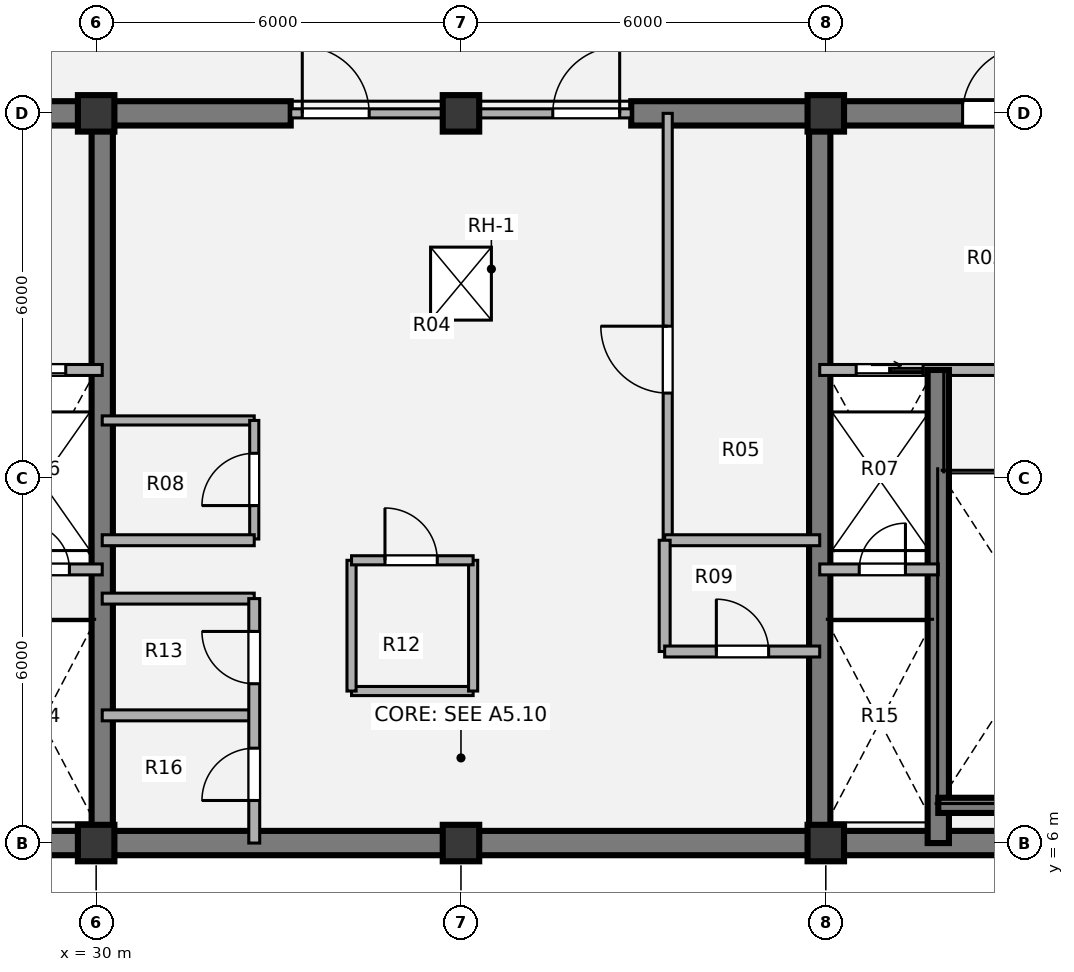
"""IFC4 building model, lengths in metres.
Left out: names, types, materials, properties, quantities, classifications, styles, units other than length and angle.
Written with IfcOpenShell. Run it as: python <this file> out.ifc"""

import sys

from ifc_helpers import new_model, si_unit, direction, frame, frame_2d, origin, origin_2d, place, context, subcontext, project, spatial, rectangle, extrude, source, transform, mapped, element, fill, save


model = new_model("IFC4")
c1 = context("Model", 3, precision=1e-05, world=origin(), true_north=direction((0.0, 1.0)))
c2 = subcontext(c1, "Body", "Model", "MODEL_VIEW")
j1 = project(units=[si_unit("LENGTHUNIT", "METRE"), si_unit("PLANEANGLEUNIT", "RADIAN")], contexts=[c1])
p1 = place(None, origin())
s1 = spatial("IfcSite", under=j1, at=p1, CompositionType="ELEMENT")
p2 = place(p1, origin())
s2 = spatial("IfcBuilding", under=s1, at=p2, CompositionType="ELEMENT")
p3 = place(p2, frame((0.0, 0.0, 315.72)))
s3 = spatial("IfcBuildingStorey", under=s2, at=p3, CompositionType="ELEMENT", Elevation=315.72)
m1 = source(origin(), c2, "Body", "SweptSolid", [
    extrude(rectangle(XDim=0.6, YDim=0.6, at=origin_2d()), origin(), (0.0, 0.0, 1.0), 3.96),
])
for number, where, z_axis, x_axis in (
    (1, (30.0, 6.0, 0.0), (0.0, 0.0, 1.0), (1.0, 0.0, 0.0)),
    (2, (36.0, 6.0, 0.0), (0.0, 0.0, 1.0), (1.0, 0.0, 0.0)),
    (3, (42.0, 6.0, 0.0), (0.0, 0.0, 1.0), (1.0, 0.0, 0.0)),
    (4, (30.0, 18.0, 0.0), (0.0, 0.0, 1.0), (1.0, 0.0, 0.0)),
    (5, (36.0, 18.0, 0.0), (0.0, 0.0, 1.0), (1.0, 0.0, 0.0)),
    (6, (42.0, 18.0, 0.0), (0.0, 0.0, 1.0), (1.0, 0.0, 0.0)),
):
    element("IfcColumn", number, at=place(p3, frame(where, z_axis=z_axis, x_axis=x_axis)), inside=s3, PredefinedType="COLUMN", context=c2, shape_type="MappedRepresentation", body=[
        mapped(m1, transform((0.0, 0.0, 0.0), x_axis=(1.0, 0.0, 0.0), y_axis=(0.0, 1.0, 0.0), z_axis=(0.0, 0.0, 1.0), scale=1.0)),
    ])
p4 = place(p3, frame((48.2, 6.0, 0.0), z_axis=(0.0, 0.0, 1.0), x_axis=(-1.0, 0.0, 0.0)))
e7 = element("IfcWall", 7, at=p4, inside=s3, PredefinedType="SHEAR", context=c2, shape_type="SweptSolid", body=[
    extrude(rectangle(XDim=24.4, YDim=0.4, at=frame_2d((12.2, 0.0))), origin(), (0.0, 0.0, 1.0), 3.96),
])
p5 = place(p3, frame((23.8, 18.0, 0.0), z_axis=(0.0, 0.0, 1.0), x_axis=(1.0, 0.0, 0.0)))
e8 = element("IfcWall", 8, at=p5, inside=s3, PredefinedType="SHEAR", context=c2, shape_type="SweptSolid", body=[
    extrude(rectangle(XDim=9.4, YDim=0.4, at=frame_2d((4.7, 0.0))), origin(), (0.0, 0.0, 1.0), 3.96),
])
p6 = place(p5, frame((2.95, 0.0, 0.0)))
e9 = element("IfcOpeningElement", 9, at=p6, cuts=e8, PredefinedType="OPENING", context=c2, shape_type="SweptSolid", body=[
    extrude(rectangle(XDim=1.1, YDim=2.1, at=origin_2d()), frame((0.55, 0.21, 1.05), z_axis=(0.0, -1.0, 0.0), x_axis=(1.0, 0.0, 0.0)), (0.0, 0.0, 1.0), 0.42),
])
p7 = place(p3, frame((38.8, 18.0, 0.0), z_axis=(0.0, 0.0, 1.0), x_axis=(1.0, 0.0, 0.0)))
e10 = element("IfcWall", 10, at=p7, inside=s3, PredefinedType="SHEAR", context=c2, shape_type="SweptSolid", body=[
    extrude(rectangle(XDim=9.4, YDim=0.4, at=frame_2d((4.7, 0.0))), origin(), (0.0, 0.0, 1.0), 3.96),
])
p8 = place(p7, frame((5.45, 0.0, 0.0)))
e11 = element("IfcOpeningElement", 11, at=p8, cuts=e10, PredefinedType="OPENING", context=c2, shape_type="SweptSolid", body=[
    extrude(rectangle(XDim=1.1, YDim=2.1, at=origin_2d()), frame((0.55, 0.21, 1.05), z_axis=(0.0, -1.0, 0.0), x_axis=(1.0, 0.0, 0.0)), (0.0, 0.0, 1.0), 0.42),
])
for number, where, z_axis, x_axis in (
    (12, (30.1, 6.0, 0.0), (0.0, 0.0, 1.0), (0.0, 1.0, 0.0)),
    (13, (41.9, 18.0, 0.0), (0.0, 0.0, 1.0), (0.0, -1.0, 0.0)),
):
    element("IfcWall", number, at=place(p3, frame(where, z_axis=z_axis, x_axis=x_axis)), inside=s3, PredefinedType="SHEAR", context=c2, shape_type="SweptSolid", body=[
        extrude(rectangle(XDim=12.0, YDim=0.35, at=frame_2d((6.0, 0.0))), origin(), (0.0, 0.0, 1.0), 3.96),
    ])
p9 = place(p3, frame((30.1, 12.95, 0.0), z_axis=(0.0, 0.0, 1.0), x_axis=(1.0, 0.0, 0.0)))
e14 = element("IfcWall", 14, at=p9, inside=s3, PredefinedType="PARTITIONING", context=c2, shape_type="SweptSolid", body=[
    extrude(rectangle(XDim=2.5, YDim=0.15, at=frame_2d((1.25, 0.0))), origin(), (0.0, 0.0, 1.0), 3.61),
])
p10 = place(p3, frame((32.6, 11.0, 0.0), z_axis=(0.0, 0.0, 1.0), x_axis=(0.0, 1.0, 0.0)))
e15 = element("IfcWall", 15, at=p10, inside=s3, PredefinedType="PARTITIONING", context=c2, shape_type="SweptSolid", body=[
    extrude(rectangle(XDim=1.95, YDim=0.15, at=frame_2d((0.975, 0.0))), origin(), (0.0, 0.0, 1.0), 3.61),
])
p11 = place(p10, frame((0.55, 0.0, 0.0)))
e16 = element("IfcOpeningElement", 16, at=p11, cuts=e15, PredefinedType="OPENING", context=c2, shape_type="SweptSolid", body=[
    extrude(rectangle(XDim=0.86, YDim=2.1, at=origin_2d()), frame((0.43, 0.085, 1.05), z_axis=(0.0, -1.0, 0.0), x_axis=(1.0, 0.0, 0.0)), (0.0, 0.0, 1.0), 0.17),
])
p12 = place(p3, frame((34.2, 8.5, 0.0), z_axis=(0.0, 0.0, 1.0), x_axis=(1.0, 0.0, 0.0)))
e17 = element("IfcWall", 17, at=p12, inside=s3, PredefinedType="PARTITIONING", context=c2, shape_type="SweptSolid", body=[
    extrude(rectangle(XDim=2.0, YDim=0.15, at=frame_2d((1.0, 0.0))), origin(), (0.0, 0.0, 1.0), 3.61),
])
p13 = place(p3, frame((34.2, 8.5, 0.0), z_axis=(0.0, 0.0, 1.0), x_axis=(0.0, 1.0, 0.0)))
e18 = element("IfcWall", 18, at=p13, inside=s3, PredefinedType="PARTITIONING", context=c2, shape_type="SweptSolid", body=[
    extrude(rectangle(XDim=2.15, YDim=0.15, at=frame_2d((1.075, 0.0))), origin(), (0.0, 0.0, 1.0), 3.61),
])
p14 = place(p3, frame((36.2, 8.5, 0.0), z_axis=(0.0, 0.0, 1.0), x_axis=(0.0, 1.0, 0.0)))
e19 = element("IfcWall", 19, at=p14, inside=s3, PredefinedType="PARTITIONING", context=c2, shape_type="SweptSolid", body=[
    extrude(rectangle(XDim=2.15, YDim=0.15, at=frame_2d((1.075, 0.0))), origin(), (0.0, 0.0, 1.0), 2.825),
])
p15 = place(p3, frame((34.2, 10.65, 0.0), z_axis=(0.0, 0.0, 1.0), x_axis=(1.0, 0.0, 0.0)))
e20 = element("IfcWall", 20, at=p15, inside=s3, PredefinedType="PARTITIONING", context=c2, shape_type="SweptSolid", body=[
    extrude(rectangle(XDim=2.0, YDim=0.15, at=frame_2d((1.0, 0.0))), origin(), (0.0, 0.0, 1.0), 3.61),
])
p16 = place(p15, frame((0.55, 0.0, 0.0)))
e21 = element("IfcOpeningElement", 21, at=p16, cuts=e20, PredefinedType="OPENING", context=c2, shape_type="SweptSolid", body=[
    extrude(rectangle(XDim=0.86, YDim=2.1, at=origin_2d()), frame((0.43, 0.085, 1.05), z_axis=(0.0, -1.0, 0.0), x_axis=(1.0, 0.0, 0.0)), (0.0, 0.0, 1.0), 0.17),
])
p17 = place(p3, frame((39.4, 11.0, 0.0), z_axis=(0.0, 0.0, 1.0), x_axis=(0.0, 1.0, 0.0)))
e22 = element("IfcWall", 22, at=p17, inside=s3, PredefinedType="PARTITIONING", context=c2, shape_type="SweptSolid", body=[
    extrude(rectangle(XDim=7.0, YDim=0.15, at=frame_2d((3.5, 0.0))), origin(), (0.0, 0.0, 1.0), 3.61),
])
p18 = place(p17, frame((2.4, 0.0, 0.0)))
e23 = element("IfcOpeningElement", 23, at=p18, cuts=e22, PredefinedType="OPENING", context=c2, shape_type="SweptSolid", body=[
    extrude(rectangle(XDim=1.1, YDim=2.1, at=origin_2d()), frame((0.55, 0.085, 1.05), z_axis=(0.0, -1.0, 0.0), x_axis=(1.0, 0.0, 0.0)), (0.0, 0.0, 1.0), 0.17),
])
p19 = place(p3, frame((30.1, 10.98, 0.0), z_axis=(0.0, 0.0, 1.0), x_axis=(1.0, 0.0, 0.0)))
e24 = element("IfcWall", 24, at=p19, inside=s3, PredefinedType="PARTITIONING", context=c2, shape_type="SweptSolid", body=[
    extrude(rectangle(XDim=2.5, YDim=0.18, at=frame_2d((1.25, 0.0))), origin(), (0.0, 0.0, 1.0), 3.61),
])
p20 = place(p3, frame((39.35, 10.98, 0.0), z_axis=(0.0, 0.0, 1.0), x_axis=(1.0, 0.0, 0.0)))
e25 = element("IfcWall", 25, at=p20, inside=s3, PredefinedType="PARTITIONING", context=c2, shape_type="SweptSolid", body=[
    extrude(rectangle(XDim=2.55, YDim=0.18, at=frame_2d((1.275, 0.0))), origin(), (0.0, 0.0, 1.0), 3.61),
])
for number, where, z_axis, x_axis in (
    (26, (30.1, 8.1, 0.0), (0.0, 0.0, 1.0), (1.0, 0.0, 0.0)),
    (27, (30.1, 10.02, 0.0), (0.0, 0.0, 1.0), (1.0, 0.0, 0.0)),
):
    element("IfcWall", number, at=place(p3, frame(where, z_axis=z_axis, x_axis=x_axis)), inside=s3, PredefinedType="PARTITIONING", context=c2, shape_type="SweptSolid", body=[
        extrude(rectangle(XDim=2.5, YDim=0.18, at=frame_2d((1.25, 0.0))), origin(), (0.0, 0.0, 1.0), 3.61),
    ])
p21 = place(p3, frame((32.6, 6.0, 0.0), z_axis=(0.0, 0.0, 1.0), x_axis=(0.0, 1.0, 0.0)))
e28 = element("IfcWall", 28, at=p21, inside=s3, PredefinedType="PARTITIONING", context=c2, shape_type="SweptSolid", body=[
    extrude(rectangle(XDim=4.02, YDim=0.18, at=frame_2d((2.01, 0.0))), origin(), (0.0, 0.0, 1.0), 3.61),
])
p22 = place(p21, frame((0.7, 0.0, 0.0)))
e29 = element("IfcOpeningElement", 29, at=p22, cuts=e28, PredefinedType="OPENING", context=c2, shape_type="SweptSolid", body=[
    extrude(rectangle(XDim=0.86, YDim=2.1, at=origin_2d()), frame((0.43, 0.1, 1.05), z_axis=(0.0, -1.0, 0.0), x_axis=(1.0, 0.0, 0.0)), (0.0, 0.0, 1.0), 0.2),
])
p23 = place(p21, frame((2.62, 0.0, 0.0)))
e30 = element("IfcOpeningElement", 30, at=p23, cuts=e28, PredefinedType="OPENING", context=c2, shape_type="SweptSolid", body=[
    extrude(rectangle(XDim=0.86, YDim=2.1, at=origin_2d()), frame((0.43, 0.1, 1.05), z_axis=(0.0, -1.0, 0.0), x_axis=(1.0, 0.0, 0.0)), (0.0, 0.0, 1.0), 0.2),
])
p24 = place(p3, frame((39.35, 9.15, 0.0), z_axis=(0.0, 0.0, 1.0), x_axis=(0.0, 1.0, 0.0)))
e31 = element("IfcWall", 31, at=p24, inside=s3, PredefinedType="PARTITIONING", context=c2, shape_type="SweptSolid", body=[
    extrude(rectangle(XDim=1.83, YDim=0.18, at=frame_2d((0.915, 0.0))), origin(), (0.0, 0.0, 1.0), 3.61),
])
p25 = place(p3, frame((39.35, 9.15, 0.0), z_axis=(0.0, 0.0, 1.0), x_axis=(1.0, 0.0, 0.0)))
e32 = element("IfcWall", 32, at=p25, inside=s3, PredefinedType="PARTITIONING", context=c2, shape_type="SweptSolid", body=[
    extrude(rectangle(XDim=2.55, YDim=0.18, at=frame_2d((1.275, 0.0))), origin(), (0.0, 0.0, 1.0), 3.61),
])
p26 = place(p25, frame((0.85, 0.0, 0.0)))
e33 = element("IfcOpeningElement", 33, at=p26, cuts=e32, PredefinedType="OPENING", context=c2, shape_type="SweptSolid", body=[
    extrude(rectangle(XDim=0.86, YDim=2.1, at=origin_2d()), frame((0.43, 0.1, 1.05), z_axis=(0.0, -1.0, 0.0), x_axis=(1.0, 0.0, 0.0)), (0.0, 0.0, 1.0), 0.2),
])
p27 = place(p3, frame((33.2, 18.0, 0.0), z_axis=(0.0, 0.0, 1.0), x_axis=(1.0, 0.0, 0.0)))
e34 = element("IfcWall", 34, at=p27, inside=s3, PredefinedType="PARTITIONING", context=c2, shape_type="SweptSolid", body=[
    extrude(rectangle(XDim=5.6, YDim=0.15, at=frame_2d((2.8, 0.0))), origin(), (0.0, 0.0, 1.0), 2.625),
])
p28 = place(p27, frame((0.19, 0.0, 0.0)))
e35 = element("IfcOpeningElement", 35, at=p28, cuts=e34, PredefinedType="OPENING", context=c2, shape_type="SweptSolid", body=[
    extrude(rectangle(XDim=1.1, YDim=2.1, at=origin_2d()), frame((0.55, 0.085, 1.05), z_axis=(0.0, -1.0, 0.0), x_axis=(1.0, 0.0, 0.0)), (0.0, 0.0, 1.0), 0.17),
])
p29 = place(p27, frame((4.31, 0.0, 0.0)))
e36 = element("IfcOpeningElement", 36, at=p29, cuts=e34, PredefinedType="OPENING", context=c2, shape_type="SweptSolid", body=[
    extrude(rectangle(XDim=1.1, YDim=2.1, at=origin_2d()), frame((0.55, 0.085, 1.05), z_axis=(0.0, -1.0, 0.0), x_axis=(1.0, 0.0, 0.0)), (0.0, 0.0, 1.0), 0.17),
])
p30 = place(p3, frame((24.0, 13.78, 0.0), z_axis=(0.0, 0.0, 1.0), x_axis=(1.0, 0.0, 0.0)))
e37 = element("IfcWall", 37, at=p30, inside=s3, PredefinedType="PARTITIONING", context=c2, shape_type="SweptSolid", body=[
    extrude(rectangle(XDim=6.1, YDim=0.18, at=frame_2d((3.05, 0.0))), origin(), (0.0, 0.0, 1.0), 3.61),
])
p31 = place(p30, frame((1.15, 0.0, 0.0)))
e38 = element("IfcOpeningElement", 38, at=p31, cuts=e37, PredefinedType="OPENING", context=c2, shape_type="SweptSolid", body=[
    extrude(rectangle(XDim=1.1, YDim=2.1, at=origin_2d()), frame((0.55, 0.1, 1.05), z_axis=(0.0, -1.0, 0.0), x_axis=(1.0, 0.0, 0.0)), (0.0, 0.0, 1.0), 0.2),
])
p32 = place(p30, frame((4.4, 0.0, 0.0)))
e39 = element("IfcOpeningElement", 39, at=p32, cuts=e37, PredefinedType="OPENING", context=c2, shape_type="SweptSolid", body=[
    extrude(rectangle(XDim=1.1, YDim=2.1, at=origin_2d()), frame((0.55, 0.1, 1.05), z_axis=(0.0, -1.0, 0.0), x_axis=(1.0, 0.0, 0.0)), (0.0, 0.0, 1.0), 0.2),
])
p33 = place(p3, frame((28.15, 10.5, 0.0), z_axis=(0.0, 0.0, 1.0), x_axis=(1.0, 0.0, 0.0)))
e40 = element("IfcWall", 40, at=p33, inside=s3, PredefinedType="PARTITIONING", context=c2, shape_type="SweptSolid", body=[
    extrude(rectangle(XDim=1.95, YDim=0.18, at=frame_2d((0.975, 0.0))), origin(), (0.0, 0.0, 1.0), 3.61),
])
p34 = place(p33, frame((0.65, 0.0, 0.0)))
e41 = element("IfcOpeningElement", 41, at=p34, cuts=e40, PredefinedType="OPENING", context=c2, shape_type="SweptSolid", body=[
    extrude(rectangle(XDim=0.76, YDim=2.05, at=origin_2d()), frame((0.38, 0.1, 1.025), z_axis=(0.0, -1.0, 0.0), x_axis=(1.0, 0.0, 0.0)), (0.0, 0.0, 1.0), 0.2),
])
p35 = place(p3, frame((41.9, 13.78, 0.0), z_axis=(0.0, 0.0, 1.0), x_axis=(1.0, 0.0, 0.0)))
e42 = element("IfcWall", 42, at=p35, inside=s3, PredefinedType="PARTITIONING", context=c2, shape_type="SweptSolid", body=[
    extrude(rectangle(XDim=6.1, YDim=0.18, at=frame_2d((3.05, 0.0))), origin(), (0.0, 0.0, 1.0), 3.61),
])
p36 = place(p35, frame((0.6, 0.0, 0.0)))
e43 = element("IfcOpeningElement", 43, at=p36, cuts=e42, PredefinedType="OPENING", context=c2, shape_type="SweptSolid", body=[
    extrude(rectangle(XDim=1.1, YDim=2.1, at=origin_2d()), frame((0.55, 0.1, 1.05), z_axis=(0.0, -1.0, 0.0), x_axis=(1.0, 0.0, 0.0)), (0.0, 0.0, 1.0), 0.2),
])
p37 = place(p35, frame((3.8, 0.0, 0.0)))
e44 = element("IfcOpeningElement", 44, at=p37, cuts=e42, PredefinedType="OPENING", context=c2, shape_type="SweptSolid", body=[
    extrude(rectangle(XDim=1.1, YDim=2.1, at=origin_2d()), frame((0.55, 0.1, 1.05), z_axis=(0.0, -1.0, 0.0), x_axis=(1.0, 0.0, 0.0)), (0.0, 0.0, 1.0), 0.2),
])
p38 = place(p3, frame((43.85, 6.0, 0.0), z_axis=(0.0, 0.0, 1.0), x_axis=(0.0, 1.0, 0.0)))
e45 = element("IfcWall", 45, at=p38, inside=s3, PredefinedType="SHEAR", context=c2, shape_type="SweptSolid", body=[
    extrude(rectangle(XDim=7.78, YDim=0.35, at=frame_2d((3.89, 0.0))), origin(), (0.0, 0.0, 1.0), 3.96),
])
p39 = place(p3, frame((43.85, 6.62, 0.0), z_axis=(0.0, 0.0, 1.0), x_axis=(1.0, 0.0, 0.0)))
e46 = element("IfcWall", 46, at=p39, inside=s3, PredefinedType="SHEAR", context=c2, shape_type="SweptSolid", body=[
    extrude(rectangle(XDim=3.57, YDim=0.25, at=frame_2d((1.785, 0.0))), origin(), (0.0, 0.0, 1.0), 3.96),
])
p40 = place(p3, frame((41.9, 10.5, 0.0), z_axis=(0.0, 0.0, 1.0), x_axis=(1.0, 0.0, 0.0)))
e47 = element("IfcWall", 47, at=p40, inside=s3, PredefinedType="PARTITIONING", context=c2, shape_type="SweptSolid", body=[
    extrude(rectangle(XDim=1.95, YDim=0.18, at=frame_2d((0.975, 0.0))), origin(), (0.0, 0.0, 1.0), 3.61),
])
p41 = place(p40, frame((0.65, 0.0, 0.0)))
e48 = element("IfcOpeningElement", 48, at=p41, cuts=e47, PredefinedType="OPENING", context=c2, shape_type="SweptSolid", body=[
    extrude(rectangle(XDim=0.76, YDim=2.05, at=origin_2d()), frame((0.38, 0.1, 1.025), z_axis=(0.0, -1.0, 0.0), x_axis=(1.0, 0.0, 0.0)), (0.0, 0.0, 1.0), 0.2),
])
p42 = place(p3, frame((0.0, 0.0, 3.68)))
p43 = place(p42, frame((36.0, 15.2, -0.01)))
p44 = place(p43, frame((0.0, 0.0, 0.24)))
e49 = element("IfcWindow", 49, at=p44, inside=s3, PartitioningType="SINGLE_PANEL", PredefinedType="SKYLIGHT", context=c2, shape_type="SweptSolid", body=[
    extrude(rectangle(XDim=1.0, YDim=1.2, at=origin_2d()), origin(), (0.0, 0.0, 1.0), 0.05),
])
m2 = source(origin(), c2, "Body", "SweptSolid", [
    extrude(rectangle(XDim=0.86, YDim=2.1, at=origin_2d()), frame((0.43, 0.025, 1.05), z_axis=(0.0, -1.0, 0.0), x_axis=(1.0, 0.0, 0.0)), (0.0, 0.0, 1.0), 0.05),
])
p45 = place(p11, origin())
e50 = element("IfcDoor", 50, at=p45, inside=s3, OperationType="SINGLE_SWING_LEFT", PredefinedType="DOOR", context=c2, shape_type="MappedRepresentation", body=[
    mapped(m2, transform((0.0, 0.0, 0.0), x_axis=(1.0, 0.0, 0.0), y_axis=(0.0, 1.0, 0.0), z_axis=(0.0, 0.0, 1.0), scale=1.0)),
])
fill(e16, e50)
p46 = place(p16, origin())
e51 = element("IfcDoor", 51, at=p46, inside=s3, OperationType="SINGLE_SWING_LEFT", PredefinedType="DOOR", context=c2, shape_type="MappedRepresentation", body=[
    mapped(m2, transform((0.0, 0.0, 0.0), x_axis=(1.0, 0.0, 0.0), y_axis=(0.0, 1.0, 0.0), z_axis=(0.0, 0.0, 1.0), scale=1.0)),
])
fill(e21, e51)
m3 = source(origin(), c2, "Body", "SweptSolid", [
    extrude(rectangle(XDim=1.1, YDim=2.1, at=origin_2d()), frame((0.55, 0.025, 1.05), z_axis=(0.0, -1.0, 0.0), x_axis=(1.0, 0.0, 0.0)), (0.0, 0.0, 1.0), 0.05),
])
p47 = place(p18, origin())
e52 = element("IfcDoor", 52, at=p47, inside=s3, OperationType="SINGLE_SWING_RIGHT", PredefinedType="DOOR", context=c2, shape_type="MappedRepresentation", body=[
    mapped(m3, transform((0.0, 0.0, 0.0), x_axis=(1.0, 0.0, 0.0), y_axis=(0.0, 1.0, 0.0), z_axis=(0.0, 0.0, 1.0), scale=1.0)),
])
fill(e23, e52)
p48 = place(p22, origin())
e53 = element("IfcDoor", 53, at=p48, inside=s3, OperationType="SINGLE_SWING_LEFT", PredefinedType="DOOR", context=c2, shape_type="MappedRepresentation", body=[
    mapped(m2, transform((0.0, 0.0, 0.0), x_axis=(1.0, 0.0, 0.0), y_axis=(0.0, 1.0, 0.0), z_axis=(0.0, 0.0, 1.0), scale=1.0)),
])
fill(e29, e53)
p49 = place(p23, origin())
e54 = element("IfcDoor", 54, at=p49, inside=s3, OperationType="SINGLE_SWING_RIGHT", PredefinedType="DOOR", context=c2, shape_type="MappedRepresentation", body=[
    mapped(m2, transform((0.0, 0.0, 0.0), x_axis=(1.0, 0.0, 0.0), y_axis=(0.0, 1.0, 0.0), z_axis=(0.0, 0.0, 1.0), scale=1.0)),
])
fill(e30, e54)
p50 = place(p26, origin())
e55 = element("IfcDoor", 55, at=p50, inside=s3, OperationType="SINGLE_SWING_LEFT", PredefinedType="DOOR", context=c2, shape_type="MappedRepresentation", body=[
    mapped(m2, transform((0.0, 0.0, 0.0), x_axis=(1.0, 0.0, 0.0), y_axis=(0.0, 1.0, 0.0), z_axis=(0.0, 0.0, 1.0), scale=1.0)),
])
fill(e33, e55)
m4 = source(origin(), c2, "Body", "SweptSolid", [
    extrude(rectangle(XDim=1.1, YDim=2.1, at=origin_2d()), frame((0.55, 0.025, 1.05), z_axis=(0.0, -1.0, 0.0), x_axis=(1.0, 0.0, 0.0)), (0.0, 0.0, 1.0), 0.05),
])
p51 = place(p28, origin())
e56 = element("IfcDoor", 56, at=p51, inside=s3, OperationType="SINGLE_SWING_LEFT", PredefinedType="DOOR", context=c2, shape_type="MappedRepresentation", body=[
    mapped(m4, transform((0.0, 0.0, 0.0), x_axis=(1.0, 0.0, 0.0), y_axis=(0.0, 1.0, 0.0), z_axis=(0.0, 0.0, 1.0), scale=1.0)),
])
fill(e35, e56)
p52 = place(p29, origin())
e57 = element("IfcDoor", 57, at=p52, inside=s3, OperationType="SINGLE_SWING_RIGHT", PredefinedType="DOOR", context=c2, shape_type="MappedRepresentation", body=[
    mapped(m4, transform((0.0, 0.0, 0.0), x_axis=(1.0, 0.0, 0.0), y_axis=(0.0, 1.0, 0.0), z_axis=(0.0, 0.0, 1.0), scale=1.0)),
])
fill(e36, e57)
m5 = source(origin(), c2, "Body", "SweptSolid", [
    extrude(rectangle(XDim=1.1, YDim=2.1, at=origin_2d()), frame((0.55, 0.025, 1.05), z_axis=(0.0, -1.0, 0.0), x_axis=(1.0, 0.0, 0.0)), (0.0, 0.0, 1.0), 0.05),
])
p53 = place(p32, origin())
e58 = element("IfcDoor", 58, at=p53, inside=s3, OperationType="SLIDING_TO_LEFT", PredefinedType="DOOR", context=c2, shape_type="MappedRepresentation", body=[
    mapped(m5, transform((0.0, 0.0, 0.0), x_axis=(1.0, 0.0, 0.0), y_axis=(0.0, 1.0, 0.0), z_axis=(0.0, 0.0, 1.0), scale=1.0)),
])
fill(e39, e58)
m6 = source(origin(), c2, "Body", "SweptSolid", [
    extrude(rectangle(XDim=0.76, YDim=2.05, at=origin_2d()), frame((0.38, 0.025, 1.025), z_axis=(0.0, -1.0, 0.0), x_axis=(1.0, 0.0, 0.0)), (0.0, 0.0, 1.0), 0.05),
])
p54 = place(p34, origin())
e59 = element("IfcDoor", 59, at=p54, inside=s3, OperationType="SINGLE_SWING_LEFT", PredefinedType="DOOR", context=c2, shape_type="MappedRepresentation", body=[
    mapped(m6, transform((0.0, 0.0, 0.0), x_axis=(1.0, 0.0, 0.0), y_axis=(0.0, 1.0, 0.0), z_axis=(0.0, 0.0, 1.0), scale=1.0)),
])
fill(e41, e59)
p55 = place(p36, origin())
e60 = element("IfcDoor", 60, at=p55, inside=s3, OperationType="SLIDING_TO_RIGHT", PredefinedType="DOOR", context=c2, shape_type="MappedRepresentation", body=[
    mapped(m5, transform((0.0, 0.0, 0.0), x_axis=(1.0, 0.0, 0.0), y_axis=(0.0, 1.0, 0.0), z_axis=(0.0, 0.0, 1.0), scale=1.0)),
])
fill(e43, e60)
p56 = place(p41, origin())
e61 = element("IfcDoor", 61, at=p56, inside=s3, OperationType="SINGLE_SWING_RIGHT", PredefinedType="DOOR", context=c2, shape_type="MappedRepresentation", body=[
    mapped(m6, transform((0.0, 0.0, 0.0), x_axis=(1.0, 0.0, 0.0), y_axis=(0.0, 1.0, 0.0), z_axis=(0.0, 0.0, 1.0), scale=1.0)),
])
fill(e48, e61)
p57 = place(p8, origin())
e62 = element("IfcDoor", 62, at=p57, inside=s3, OperationType="SINGLE_SWING_RIGHT", PredefinedType="DOOR", context=c2, shape_type="MappedRepresentation", body=[
    mapped(m4, transform((0.0, 0.0, 0.0), x_axis=(1.0, 0.0, 0.0), y_axis=(0.0, 1.0, 0.0), z_axis=(0.0, 0.0, 1.0), scale=1.0)),
])
fill(e11, e62)
save(model, sys.argv[1])
